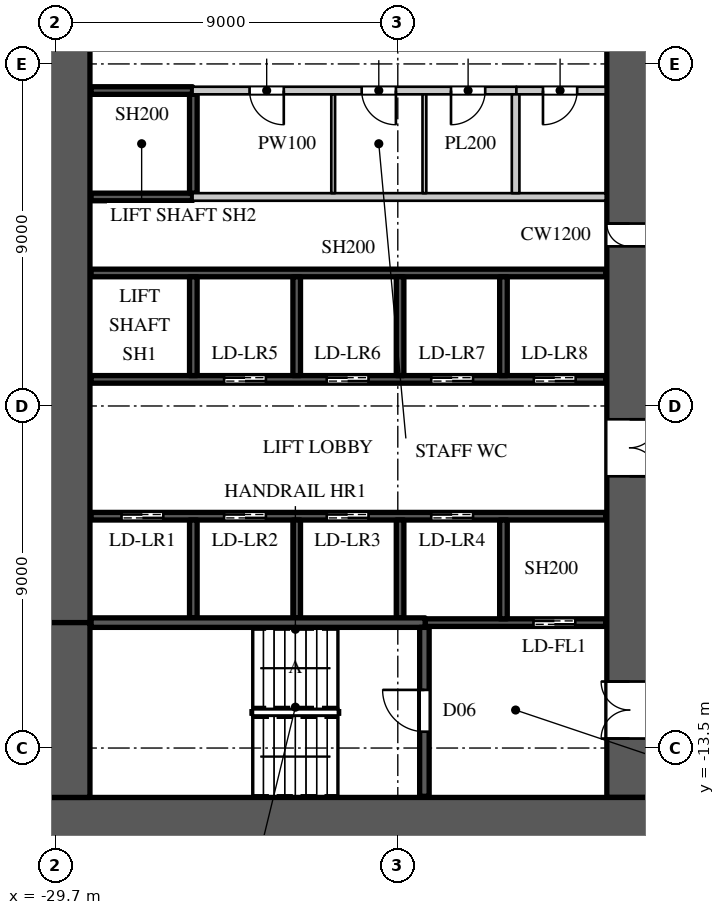
"""IFC4 building model, lengths in metres.
Left out: names, types, materials, properties, quantities, classifications, styles, units other than length and angle.
Written with IfcOpenShell. Run it as: python <this file> out.ifc"""

import sys

from ifc_helpers import new_model, si_unit, direction, frame, frame_2d, origin, place, context, subcontext, project, spatial, rectangle, extrude, element, fill, save


model = new_model("IFC4")
c1 = context("Model", 3, precision=1e-05, world=origin(), true_north=direction((0.0, 1.0)))
c2 = subcontext(c1, "Body", "Model", "MODEL_VIEW")
j1 = project(units=[si_unit("LENGTHUNIT", "METRE"), si_unit("PLANEANGLEUNIT", "RADIAN")], contexts=[c1])
p1 = place(None, origin())
s1 = spatial("IfcSite", under=j1, at=p1, CompositionType="ELEMENT")
p2 = place(p1, origin())
s2 = spatial("IfcBuilding", under=s1, at=p2, CompositionType="ELEMENT")
p3 = place(p2, frame((0.0, 0.0, 44.0)))
s3 = spatial("IfcBuildingStorey", under=s2, at=p3, CompositionType="ELEMENT", Elevation=44.0)
p4 = place(p3, frame((-30.0, -15.4, 0.0), z_axis=(0.0, 0.0, 1.0), x_axis=(1.0, 0.0, 0.0)))
e1 = element("IfcWall", 1, at=p4, inside=s3, PredefinedType="SHEAR", context=c2, shape_type="SweptSolid", body=[
    extrude(rectangle(XDim=16.0, YDim=1.2, at=frame_2d((8.0, 0.0))), origin(), (0.0, 0.0, 1.0), 6.0),
])
p5 = place(p3, frame((-14.6, -14.8, 0.0), z_axis=(0.0, 0.0, 1.0), x_axis=(0.0, 1.0, 0.0)))
e2 = element("IfcWall", 2, at=p5, inside=s3, PredefinedType="SHEAR", context=c2, shape_type="SweptSolid", body=[
    extrude(rectangle(XDim=29.6, YDim=1.2, at=frame_2d((14.8, 0.0))), origin(), (0.0, 0.0, 1.0), 6.0),
])
p6 = place(p5, frame((1.55, 0.0, 0.0)))
e3 = element("IfcOpeningElement", 3, at=p6, cuts=e2, PredefinedType="OPENING", context=c2, shape_type="SweptSolid", body=[
    extrude(rectangle(XDim=1.5, YDim=2.4, at=frame_2d((0.75, 1.2))), frame((0.0, 0.61, 0.0), z_axis=(0.0, -1.0, 0.0), x_axis=(1.0, 0.0, 0.0)), (0.0, 0.0, 1.0), 1.22),
])
p7 = place(p5, frame((26.55, 0.0, 0.0)))
e4 = element("IfcOpeningElement", 4, at=p7, cuts=e2, PredefinedType="OPENING", context=c2, shape_type="SweptSolid", body=[
    extrude(rectangle(XDim=1.5, YDim=2.4, at=frame_2d((0.75, 1.2))), frame((0.0, 0.61, 0.0), z_axis=(0.0, -1.0, 0.0), x_axis=(1.0, 0.0, 0.0)), (0.0, 0.0, 1.0), 1.22),
])
p8 = place(p5, frame((8.45, 0.0, 0.0)))
e5 = element("IfcOpeningElement", 5, at=p8, cuts=e2, PredefinedType="OPENING", context=c2, shape_type="SweptSolid", body=[
    extrude(rectangle(XDim=1.5, YDim=2.4, at=frame_2d((0.75, 1.2))), frame((0.0, 0.61, 0.0), z_axis=(0.0, -1.0, 0.0), x_axis=(1.0, 0.0, 0.0)), (0.0, 0.0, 1.0), 1.22),
])
p9 = place(p5, frame((19.65, 0.0, 0.0)))
e6 = element("IfcOpeningElement", 6, at=p9, cuts=e2, PredefinedType="OPENING", context=c2, shape_type="SweptSolid", body=[
    extrude(rectangle(XDim=1.5, YDim=2.4, at=frame_2d((0.75, 1.2))), frame((0.0, 0.61, 0.0), z_axis=(0.0, -1.0, 0.0), x_axis=(1.0, 0.0, 0.0)), (0.0, 0.0, 1.0), 1.22),
])
p10 = place(p5, frame((14.5, 0.0, 0.0)))
e7 = element("IfcOpeningElement", 7, at=p10, cuts=e2, PredefinedType="OPENING", context=c2, shape_type="SweptSolid", body=[
    extrude(rectangle(XDim=0.6, YDim=2.0, at=frame_2d((0.3, 1.0))), frame((0.0, 0.61, 0.0), z_axis=(0.0, -1.0, 0.0), x_axis=(1.0, 0.0, 0.0)), (0.0, 0.0, 1.0), 1.22),
])
p11 = place(p3, frame((-29.4, -10.2, 0.0), z_axis=(0.0, 0.0, 1.0), x_axis=(0.0, 1.0, 0.0)))
e8 = element("IfcWall", 8, at=p11, inside=s3, PredefinedType="SHEAR", context=c2, shape_type="SweptSolid", body=[
    extrude(rectangle(XDim=20.4, YDim=1.2, at=frame_2d((10.2, 0.0))), origin(), (0.0, 0.0, 1.0), 6.0),
])
p12 = place(p3, frame((-29.4, -14.8, 0.0), z_axis=(0.0, 0.0, 1.0), x_axis=(0.0, 1.0, 0.0)))
e9 = element("IfcWall", 9, at=p12, inside=s3, PredefinedType="SHEAR", context=c2, shape_type="SweptSolid", body=[
    extrude(rectangle(XDim=4.6, YDim=1.2, at=frame_2d((2.3, 0.0))), origin(), (0.0, 0.0, 1.0), 6.0),
])
p13 = place(p3, frame((-26.1, 3.8, 0.0), z_axis=(0.0, 0.0, 1.0), x_axis=(1.0, 0.0, 0.0)))
e10 = element("IfcWall", 10, at=p13, inside=s3, PredefinedType="PARTITIONING", context=c2, shape_type="SweptSolid", body=[
    extrude(rectangle(XDim=8.52, YDim=0.2, at=frame_2d((4.26, 0.0))), origin(), (0.0, 0.0, 1.0), 5.596),
])
p14 = place(p13, frame((1.5, 0.0, 0.0)))
e11 = element("IfcOpeningElement", 11, at=p14, cuts=e10, PredefinedType="OPENING", context=c2, shape_type="SweptSolid", body=[
    extrude(rectangle(XDim=0.9, YDim=2.2, at=frame_2d((0.45, 1.1))), frame((0.0, 0.11, 0.0), z_axis=(0.0, -1.0, 0.0), x_axis=(1.0, 0.0, 0.0)), (0.0, 0.0, 1.0), 0.22),
])
p15 = place(p13, frame((4.45, 0.0, 0.0)))
e12 = element("IfcOpeningElement", 12, at=p15, cuts=e10, PredefinedType="OPENING", context=c2, shape_type="SweptSolid", body=[
    extrude(rectangle(XDim=0.9, YDim=2.2, at=frame_2d((0.45, 1.1))), frame((0.0, 0.11, 0.0), z_axis=(0.0, -1.0, 0.0), x_axis=(1.0, 0.0, 0.0)), (0.0, 0.0, 1.0), 0.22),
])
p16 = place(p13, frame((6.8, 0.0, 0.0)))
e13 = element("IfcOpeningElement", 13, at=p16, cuts=e10, PredefinedType="OPENING", context=c2, shape_type="SweptSolid", body=[
    extrude(rectangle(XDim=0.9, YDim=2.2, at=frame_2d((0.45, 1.1))), frame((0.0, 0.11, 0.0), z_axis=(0.0, -1.0, 0.0), x_axis=(1.0, 0.0, 0.0)), (0.0, 0.0, 1.0), 0.22),
])
p17 = place(p3, frame((-26.1, 1.0, 0.0), z_axis=(0.0, 0.0, 1.0), x_axis=(1.0, 0.0, 0.0)))
e14 = element("IfcWall", 14, at=p17, inside=s3, PredefinedType="PARTITIONING", context=c2, shape_type="SweptSolid", body=[
    extrude(rectangle(XDim=10.87, YDim=0.2, at=frame_2d((5.435, 0.0))), origin(), (0.0, 0.0, 1.0), 5.596),
])
p18 = place(p3, frame((-17.58, 3.8, 0.0), z_axis=(0.0, 0.0, 1.0), x_axis=(1.0, 0.0, 0.0)))
e15 = element("IfcWall", 15, at=p18, inside=s3, PredefinedType="PARTITIONING", context=c2, shape_type="SweptSolid", body=[
    extrude(rectangle(XDim=2.35, YDim=0.2, at=frame_2d((1.175, 0.0))), origin(), (0.0, 0.0, 1.0), 5.596),
])
p19 = place(p18, frame((0.7, 0.0, 0.0)))
e16 = element("IfcOpeningElement", 16, at=p19, cuts=e15, PredefinedType="OPENING", context=c2, shape_type="SweptSolid", body=[
    extrude(rectangle(XDim=0.9, YDim=2.2, at=frame_2d((0.45, 1.1))), frame((0.0, 0.11, 0.0), z_axis=(0.0, -1.0, 0.0), x_axis=(1.0, 0.0, 0.0)), (0.0, 0.0, 1.0), 0.22),
])
p20 = place(p3, frame((-17.6, 1.1, 0.0), z_axis=(0.0, 0.0, 1.0), x_axis=(0.0, 1.0, 0.0)))
e17 = element("IfcWall", 17, at=p20, inside=s3, PredefinedType="PARTITIONING", context=c2, shape_type="SweptSolid", body=[
    extrude(rectangle(XDim=2.6, YDim=0.2, at=frame_2d((1.3, 0.0))), origin(), (0.0, 0.0, 1.0), 5.596),
])
p21 = place(p3, frame((-28.77, -7.4, 0.0), z_axis=(0.0, 0.0, 1.0), x_axis=(1.0, 0.0, 0.0)))
e18 = element("IfcWall", 18, at=p21, inside=s3, PredefinedType="SHEAR", context=c2, shape_type="SweptSolid", body=[
    extrude(rectangle(XDim=13.54, YDim=0.2, at=frame_2d((6.77, 0.0))), origin(), (0.0, 0.0, 1.0), 5.596),
])
p22 = place(p21, frame((0.8, 0.0, 0.0)))
e19 = element("IfcOpeningElement", 19, at=p22, cuts=e18, PredefinedType="OPENING", context=c2, shape_type="SweptSolid", body=[
    extrude(rectangle(XDim=1.1, YDim=2.2, at=frame_2d((0.55, 1.1))), frame((0.0, 0.11, 0.0), z_axis=(0.0, -1.0, 0.0), x_axis=(1.0, 0.0, 0.0)), (0.0, 0.0, 1.0), 0.22),
])
p23 = place(p21, frame((3.5, 0.0, 0.0)))
e20 = element("IfcOpeningElement", 20, at=p23, cuts=e18, PredefinedType="OPENING", context=c2, shape_type="SweptSolid", body=[
    extrude(rectangle(XDim=1.1, YDim=2.2, at=frame_2d((0.55, 1.1))), frame((0.0, 0.11, 0.0), z_axis=(0.0, -1.0, 0.0), x_axis=(1.0, 0.0, 0.0)), (0.0, 0.0, 1.0), 0.22),
])
p24 = place(p21, frame((6.2, 0.0, 0.0)))
e21 = element("IfcOpeningElement", 21, at=p24, cuts=e18, PredefinedType="OPENING", context=c2, shape_type="SweptSolid", body=[
    extrude(rectangle(XDim=1.1, YDim=2.2, at=frame_2d((0.55, 1.1))), frame((0.0, 0.11, 0.0), z_axis=(0.0, -1.0, 0.0), x_axis=(1.0, 0.0, 0.0)), (0.0, 0.0, 1.0), 0.22),
])
p25 = place(p21, frame((8.95, 0.0, 0.0)))
e22 = element("IfcOpeningElement", 22, at=p25, cuts=e18, PredefinedType="OPENING", context=c2, shape_type="SweptSolid", body=[
    extrude(rectangle(XDim=1.1, YDim=2.2, at=frame_2d((0.55, 1.1))), frame((0.0, 0.11, 0.0), z_axis=(0.0, -1.0, 0.0), x_axis=(1.0, 0.0, 0.0)), (0.0, 0.0, 1.0), 0.22),
])
p26 = place(p3, frame((-28.77, -3.8, 0.0), z_axis=(0.0, 0.0, 1.0), x_axis=(1.0, 0.0, 0.0)))
e23 = element("IfcWall", 23, at=p26, inside=s3, PredefinedType="SHEAR", context=c2, shape_type="SweptSolid", body=[
    extrude(rectangle(XDim=13.54, YDim=0.2, at=frame_2d((6.77, 0.0))), origin(), (0.0, 0.0, 1.0), 5.596),
])
p27 = place(p26, frame((3.5, 0.0, 0.0)))
e24 = element("IfcOpeningElement", 24, at=p27, cuts=e23, PredefinedType="OPENING", context=c2, shape_type="SweptSolid", body=[
    extrude(rectangle(XDim=1.1, YDim=2.2, at=frame_2d((0.55, 1.1))), frame((0.0, 0.11, 0.0), z_axis=(0.0, -1.0, 0.0), x_axis=(1.0, 0.0, 0.0)), (0.0, 0.0, 1.0), 0.22),
])
p28 = place(p26, frame((6.2, 0.0, 0.0)))
e25 = element("IfcOpeningElement", 25, at=p28, cuts=e23, PredefinedType="OPENING", context=c2, shape_type="SweptSolid", body=[
    extrude(rectangle(XDim=1.1, YDim=2.2, at=frame_2d((0.55, 1.1))), frame((0.0, 0.11, 0.0), z_axis=(0.0, -1.0, 0.0), x_axis=(1.0, 0.0, 0.0)), (0.0, 0.0, 1.0), 0.22),
])
p29 = place(p26, frame((8.95, 0.0, 0.0)))
e26 = element("IfcOpeningElement", 26, at=p29, cuts=e23, PredefinedType="OPENING", context=c2, shape_type="SweptSolid", body=[
    extrude(rectangle(XDim=1.1, YDim=2.2, at=frame_2d((0.55, 1.1))), frame((0.0, 0.11, 0.0), z_axis=(0.0, -1.0, 0.0), x_axis=(1.0, 0.0, 0.0)), (0.0, 0.0, 1.0), 0.22),
])
p30 = place(p26, frame((11.65, 0.0, 0.0)))
e27 = element("IfcOpeningElement", 27, at=p30, cuts=e23, PredefinedType="OPENING", context=c2, shape_type="SweptSolid", body=[
    extrude(rectangle(XDim=1.1, YDim=2.2, at=frame_2d((0.55, 1.1))), frame((0.0, 0.11, 0.0), z_axis=(0.0, -1.0, 0.0), x_axis=(1.0, 0.0, 0.0)), (0.0, 0.0, 1.0), 0.22),
])
p31 = place(p3, frame((-28.77, -1.0, 0.0), z_axis=(0.0, 0.0, 1.0), x_axis=(1.0, 0.0, 0.0)))
e28 = element("IfcWall", 28, at=p31, inside=s3, PredefinedType="SHEAR", context=c2, shape_type="SweptSolid", body=[
    extrude(rectangle(XDim=13.54, YDim=0.2, at=frame_2d((6.77, 0.0))), origin(), (0.0, 0.0, 1.0), 5.596),
])
for number, where, z_axis, x_axis in (
    (29, (-28.77, 1.0, 0.0), (0.0, 0.0, 1.0), (1.0, 0.0, 0.0)),
    (30, (-28.77, 3.8, 0.0), (0.0, 0.0, 1.0), (1.0, 0.0, 0.0)),
):
    element("IfcWall", number, at=place(p3, frame(where, z_axis=z_axis, x_axis=x_axis)), inside=s3, PredefinedType="SHEAR", context=c2, shape_type="SweptSolid", body=[
        extrude(rectangle(XDim=2.67, YDim=0.2, at=frame_2d((1.335, 0.0))), origin(), (0.0, 0.0, 1.0), 5.596),
    ])
p32 = place(p3, frame((-26.08, -10.075, 0.0), z_axis=(0.0, 0.0, 1.0), x_axis=(0.0, 1.0, 0.0)))
e31 = element("IfcWall", 31, at=p32, inside=s3, PredefinedType="SHEAR", context=c2, shape_type="SweptSolid", body=[
    extrude(rectangle(XDim=2.575, YDim=0.2, at=frame_2d((1.288, 0.0))), origin(), (0.0, 0.0, 1.0), 6.0),
])
p33 = place(p3, frame((-26.08, -3.7, 0.0), z_axis=(0.0, 0.0, 1.0), x_axis=(0.0, 1.0, 0.0)))
e32 = element("IfcWall", 32, at=p33, inside=s3, PredefinedType="SHEAR", context=c2, shape_type="SweptSolid", body=[
    extrude(rectangle(XDim=2.6, YDim=0.2, at=frame_2d((1.3, 0.0))), origin(), (0.0, 0.0, 1.0), 6.0),
])
p34 = place(p3, frame((-26.08, 1.1, 0.0), z_axis=(0.0, 0.0, 1.0), x_axis=(0.0, 1.0, 0.0)))
e33 = element("IfcWall", 33, at=p34, inside=s3, PredefinedType="SHEAR", context=c2, shape_type="SweptSolid", body=[
    extrude(rectangle(XDim=2.6, YDim=0.2, at=frame_2d((1.3, 0.0))), origin(), (0.0, 0.0, 1.0), 5.596),
])
p35 = place(p3, frame((-23.36, -10.075, 0.0), z_axis=(0.0, 0.0, 1.0), x_axis=(0.0, 1.0, 0.0)))
e34 = element("IfcWall", 34, at=p35, inside=s3, PredefinedType="SHEAR", context=c2, shape_type="SweptSolid", body=[
    extrude(rectangle(XDim=2.575, YDim=0.2, at=frame_2d((1.288, 0.0))), origin(), (0.0, 0.0, 1.0), 6.0),
])
p36 = place(p3, frame((-23.36, -3.7, 0.0), z_axis=(0.0, 0.0, 1.0), x_axis=(0.0, 1.0, 0.0)))
e35 = element("IfcWall", 35, at=p36, inside=s3, PredefinedType="SHEAR", context=c2, shape_type="SweptSolid", body=[
    extrude(rectangle(XDim=2.6, YDim=0.2, at=frame_2d((1.3, 0.0))), origin(), (0.0, 0.0, 1.0), 6.0),
])
p37 = place(p3, frame((-20.64, -10.075, 0.0), z_axis=(0.0, 0.0, 1.0), x_axis=(0.0, 1.0, 0.0)))
e36 = element("IfcWall", 36, at=p37, inside=s3, PredefinedType="SHEAR", context=c2, shape_type="SweptSolid", body=[
    extrude(rectangle(XDim=2.575, YDim=0.2, at=frame_2d((1.288, 0.0))), origin(), (0.0, 0.0, 1.0), 6.0),
])
p38 = place(p3, frame((-20.64, -3.7, 0.0), z_axis=(0.0, 0.0, 1.0), x_axis=(0.0, 1.0, 0.0)))
e37 = element("IfcWall", 37, at=p38, inside=s3, PredefinedType="SHEAR", context=c2, shape_type="SweptSolid", body=[
    extrude(rectangle(XDim=2.6, YDim=0.2, at=frame_2d((1.3, 0.0))), origin(), (0.0, 0.0, 1.0), 6.0),
])
p39 = place(p3, frame((-19.98, -10.2, 0.0), z_axis=(0.0, 0.0, 1.0), x_axis=(1.0, 0.0, 0.0)))
e38 = element("IfcWall", 38, at=p39, inside=s3, PredefinedType="SHEAR", context=c2, shape_type="SweptSolid", body=[
    extrude(rectangle(XDim=4.75, YDim=0.2, at=frame_2d((2.375, 0.0))), origin(), (0.0, 0.0, 1.0), 5.596),
])
p40 = place(p39, frame((2.85, 0.0, 0.0)))
e39 = element("IfcOpeningElement", 39, at=p40, cuts=e38, PredefinedType="OPENING", context=c2, shape_type="SweptSolid", body=[
    extrude(rectangle(XDim=1.1, YDim=2.2, at=frame_2d((0.55, 1.1))), frame((0.0, 0.11, 0.0), z_axis=(0.0, -1.0, 0.0), x_axis=(1.0, 0.0, 0.0)), (0.0, 0.0, 1.0), 0.22),
])
p41 = place(p3, frame((-17.92, -10.1, 0.0), z_axis=(0.0, 0.0, 1.0), x_axis=(0.0, 1.0, 0.0)))
e40 = element("IfcWall", 40, at=p41, inside=s3, PredefinedType="SHEAR", context=c2, shape_type="SweptSolid", body=[
    extrude(rectangle(XDim=2.6, YDim=0.2, at=frame_2d((1.3, 0.0))), origin(), (0.0, 0.0, 1.0), 6.0),
])
p42 = place(p3, frame((-17.92, -3.7, 0.0), z_axis=(0.0, 0.0, 1.0), x_axis=(0.0, 1.0, 0.0)))
e41 = element("IfcWall", 41, at=p42, inside=s3, PredefinedType="SHEAR", context=c2, shape_type="SweptSolid", body=[
    extrude(rectangle(XDim=2.6, YDim=0.2, at=frame_2d((1.3, 0.0))), origin(), (0.0, 0.0, 1.0), 6.0),
])
p43 = place(p3, frame((-28.77, -10.2, 0.0), z_axis=(0.0, 0.0, 1.0), x_axis=(1.0, 0.0, 0.0)))
e42 = element("IfcWall", 42, at=p43, inside=s3, PredefinedType="SHEAR", context=c2, shape_type="SweptSolid", body=[
    extrude(rectangle(XDim=8.79, YDim=0.25, at=frame_2d((4.395, 0.0))), origin(), (0.0, 0.0, 1.0), 5.596),
])
p44 = place(p3, frame((-20.0, -14.77, 0.0), z_axis=(0.0, 0.0, 1.0), x_axis=(0.0, 1.0, 0.0)))
e43 = element("IfcWall", 43, at=p44, inside=s3, PredefinedType="SHEAR", context=c2, shape_type="SweptSolid", body=[
    extrude(rectangle(XDim=4.445, YDim=0.25, at=frame_2d((2.223, 0.0))), origin(), (0.0, 0.0, 1.0), 5.596),
])
p45 = place(p44, frame((1.7, 0.0, 0.0)))
e44 = element("IfcOpeningElement", 44, at=p45, cuts=e43, PredefinedType="OPENING", context=c2, shape_type="SweptSolid", body=[
    extrude(rectangle(XDim=1.1, YDim=2.2, at=frame_2d((0.55, 1.1))), frame((0.0, 0.135, 0.0), z_axis=(0.0, -1.0, 0.0), x_axis=(1.0, 0.0, 0.0)), (0.0, 0.0, 1.0), 0.27),
])
for number, where, z_axis, x_axis in (
    (45, (-22.4, 1.1, 0.0), (0.0, 0.0, 1.0), (0.0, 1.0, 0.0)),
    (46, (-20.0, 1.1, 0.0), (0.0, 0.0, 1.0), (0.0, 1.0, 0.0)),
):
    element("IfcWall", number, at=place(p3, frame(where, z_axis=z_axis, x_axis=x_axis)), inside=s3, PredefinedType="PARTITIONING", context=c2, shape_type="SweptSolid", body=[
        extrude(rectangle(XDim=2.6, YDim=0.1, at=frame_2d((1.3, 0.0))), origin(), (0.0, 0.0, 1.0), 5.596),
    ])
p46 = place(p45, origin())
e47 = element("IfcDoor", 47, at=p46, inside=s3, OperationType="SINGLE_SWING_RIGHT", PredefinedType="DOOR", context=c2, shape_type="SweptSolid", body=[
    extrude(rectangle(XDim=1.1, YDim=2.2, at=frame_2d((0.55, 1.1))), frame((0.0, 0.025, 0.0), z_axis=(0.0, -1.0, 0.0), x_axis=(1.0, 0.0, 0.0)), (0.0, 0.0, 1.0), 0.05),
])
fill(e44, e47)
p47 = place(p14, origin())
e48 = element("IfcDoor", 48, at=p47, inside=s3, OperationType="SINGLE_SWING_LEFT", PredefinedType="DOOR", context=c2, shape_type="SweptSolid", body=[
    extrude(rectangle(XDim=0.9, YDim=2.2, at=frame_2d((0.45, 1.1))), frame((0.0, 0.025, 0.0), z_axis=(0.0, -1.0, 0.0), x_axis=(1.0, 0.0, 0.0)), (0.0, 0.0, 1.0), 0.05),
])
fill(e11, e48)
p48 = place(p15, origin())
e49 = element("IfcDoor", 49, at=p48, inside=s3, OperationType="SINGLE_SWING_LEFT", PredefinedType="DOOR", context=c2, shape_type="SweptSolid", body=[
    extrude(rectangle(XDim=0.9, YDim=2.2, at=frame_2d((0.45, 1.1))), frame((0.0, 0.025, 0.0), z_axis=(0.0, -1.0, 0.0), x_axis=(1.0, 0.0, 0.0)), (0.0, 0.0, 1.0), 0.05),
])
fill(e12, e49)
p49 = place(p16, origin())
e50 = element("IfcDoor", 50, at=p49, inside=s3, OperationType="SINGLE_SWING_RIGHT", PredefinedType="DOOR", context=c2, shape_type="SweptSolid", body=[
    extrude(rectangle(XDim=0.9, YDim=2.2, at=frame_2d((0.45, 1.1))), frame((0.0, 0.025, 0.0), z_axis=(0.0, -1.0, 0.0), x_axis=(1.0, 0.0, 0.0)), (0.0, 0.0, 1.0), 0.05),
])
fill(e13, e50)
p50 = place(p19, origin())
e51 = element("IfcDoor", 51, at=p50, inside=s3, OperationType="SINGLE_SWING_RIGHT", PredefinedType="DOOR", context=c2, shape_type="SweptSolid", body=[
    extrude(rectangle(XDim=0.9, YDim=2.2, at=frame_2d((0.45, 1.1))), frame((0.0, 0.025, 0.0), z_axis=(0.0, -1.0, 0.0), x_axis=(1.0, 0.0, 0.0)), (0.0, 0.0, 1.0), 0.05),
])
fill(e16, e51)
p51 = place(p22, origin())
e52 = element("IfcDoor", 52, at=p51, inside=s3, OperationType="DOUBLE_DOOR_SLIDING", PredefinedType="DOOR", context=c2, shape_type="SweptSolid", body=[
    extrude(rectangle(XDim=1.1, YDim=2.2, at=frame_2d((0.55, 1.1))), frame((0.0, 0.025, 0.0), z_axis=(0.0, -1.0, 0.0), x_axis=(1.0, 0.0, 0.0)), (0.0, 0.0, 1.0), 0.05),
])
fill(e19, e52)
p52 = place(p23, origin())
e53 = element("IfcDoor", 53, at=p52, inside=s3, OperationType="DOUBLE_DOOR_SLIDING", PredefinedType="DOOR", context=c2, shape_type="SweptSolid", body=[
    extrude(rectangle(XDim=1.1, YDim=2.2, at=frame_2d((0.55, 1.1))), frame((0.0, 0.025, 0.0), z_axis=(0.0, -1.0, 0.0), x_axis=(1.0, 0.0, 0.0)), (0.0, 0.0, 1.0), 0.05),
])
fill(e20, e53)
p53 = place(p24, origin())
e54 = element("IfcDoor", 54, at=p53, inside=s3, OperationType="DOUBLE_DOOR_SLIDING", PredefinedType="DOOR", context=c2, shape_type="SweptSolid", body=[
    extrude(rectangle(XDim=1.1, YDim=2.2, at=frame_2d((0.55, 1.1))), frame((0.0, 0.025, 0.0), z_axis=(0.0, -1.0, 0.0), x_axis=(1.0, 0.0, 0.0)), (0.0, 0.0, 1.0), 0.05),
])
fill(e21, e54)
p54 = place(p25, origin())
e55 = element("IfcDoor", 55, at=p54, inside=s3, OperationType="DOUBLE_DOOR_SLIDING", PredefinedType="DOOR", context=c2, shape_type="SweptSolid", body=[
    extrude(rectangle(XDim=1.1, YDim=2.2, at=frame_2d((0.55, 1.1))), frame((0.0, 0.025, 0.0), z_axis=(0.0, -1.0, 0.0), x_axis=(1.0, 0.0, 0.0)), (0.0, 0.0, 1.0), 0.05),
])
fill(e22, e55)
p55 = place(p40, origin())
e56 = element("IfcDoor", 56, at=p55, inside=s3, OperationType="DOUBLE_DOOR_SLIDING", PredefinedType="DOOR", context=c2, shape_type="SweptSolid", body=[
    extrude(rectangle(XDim=1.1, YDim=2.2, at=frame_2d((0.55, 1.1))), frame((0.0, 0.025, 0.0), z_axis=(0.0, -1.0, 0.0), x_axis=(1.0, 0.0, 0.0)), (0.0, 0.0, 1.0), 0.05),
])
fill(e39, e56)
p56 = place(p27, origin())
e57 = element("IfcDoor", 57, at=p56, inside=s3, OperationType="DOUBLE_DOOR_SLIDING", PredefinedType="DOOR", context=c2, shape_type="SweptSolid", body=[
    extrude(rectangle(XDim=1.1, YDim=2.2, at=frame_2d((0.55, 1.1))), frame((0.0, 0.025, 0.0), z_axis=(0.0, -1.0, 0.0), x_axis=(1.0, 0.0, 0.0)), (0.0, 0.0, 1.0), 0.05),
])
fill(e24, e57)
p57 = place(p28, origin())
e58 = element("IfcDoor", 58, at=p57, inside=s3, OperationType="DOUBLE_DOOR_SLIDING", PredefinedType="DOOR", context=c2, shape_type="SweptSolid", body=[
    extrude(rectangle(XDim=1.1, YDim=2.2, at=frame_2d((0.55, 1.1))), frame((0.0, 0.025, 0.0), z_axis=(0.0, -1.0, 0.0), x_axis=(1.0, 0.0, 0.0)), (0.0, 0.0, 1.0), 0.05),
])
fill(e25, e58)
p58 = place(p29, origin())
e59 = element("IfcDoor", 59, at=p58, inside=s3, OperationType="DOUBLE_DOOR_SLIDING", PredefinedType="DOOR", context=c2, shape_type="SweptSolid", body=[
    extrude(rectangle(XDim=1.1, YDim=2.2, at=frame_2d((0.55, 1.1))), frame((0.0, 0.025, 0.0), z_axis=(0.0, -1.0, 0.0), x_axis=(1.0, 0.0, 0.0)), (0.0, 0.0, 1.0), 0.05),
])
fill(e26, e59)
p59 = place(p30, origin())
e60 = element("IfcDoor", 60, at=p59, inside=s3, OperationType="DOUBLE_DOOR_SLIDING", PredefinedType="DOOR", context=c2, shape_type="SweptSolid", body=[
    extrude(rectangle(XDim=1.1, YDim=2.2, at=frame_2d((0.55, 1.1))), frame((0.0, 0.025, 0.0), z_axis=(0.0, -1.0, 0.0), x_axis=(1.0, 0.0, 0.0)), (0.0, 0.0, 1.0), 0.05),
])
fill(e27, e60)
p60 = place(p6, origin())
e61 = element("IfcDoor", 61, at=p60, inside=s3, OperationType="DOUBLE_DOOR_SINGLE_SWING", PredefinedType="DOOR", context=c2, shape_type="SweptSolid", body=[
    extrude(rectangle(XDim=1.5, YDim=2.4, at=frame_2d((0.75, 1.2))), frame((0.0, 0.025, 0.0), z_axis=(0.0, -1.0, 0.0), x_axis=(1.0, 0.0, 0.0)), (0.0, 0.0, 1.0), 0.05),
])
fill(e3, e61)
p61 = place(p8, origin())
e62 = element("IfcDoor", 62, at=p61, inside=s3, OperationType="DOUBLE_DOOR_SINGLE_SWING", PredefinedType="DOOR", context=c2, shape_type="SweptSolid", body=[
    extrude(rectangle(XDim=1.5, YDim=2.4, at=frame_2d((0.75, 1.2))), frame((0.0, 0.025, 0.0), z_axis=(0.0, -1.0, 0.0), x_axis=(1.0, 0.0, 0.0)), (0.0, 0.0, 1.0), 0.05),
])
fill(e5, e62)
p62 = place(p10, origin())
e63 = element("IfcDoor", 63, at=p62, inside=s3, OperationType="SINGLE_SWING_RIGHT", PredefinedType="DOOR", context=c2, shape_type="SweptSolid", body=[
    extrude(rectangle(XDim=0.6, YDim=2.0, at=frame_2d((0.3, 1.0))), frame((0.0, 0.025, 0.0), z_axis=(0.0, -1.0, 0.0), x_axis=(1.0, 0.0, 0.0)), (0.0, 0.0, 1.0), 0.05),
])
fill(e7, e63)
save(model, sys.argv[1])
